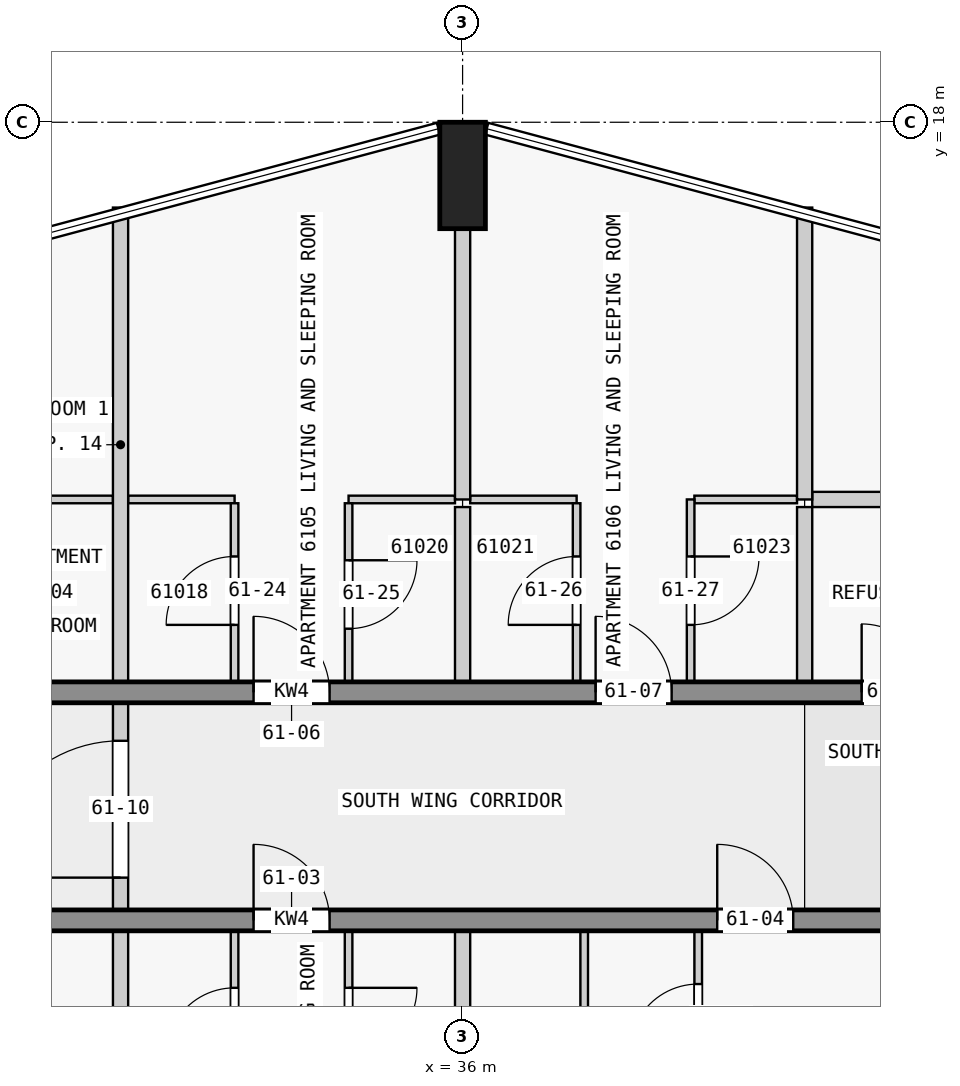
"""IFC4 building model, lengths in metres.
Left out: names, types, materials, properties, quantities, classifications, styles, units other than length and angle.
Written with IfcOpenShell. Run it as: python <this file> out.ifc"""

import sys

from ifc_helpers import new_model, si_unit, direction, frame, frame_2d, origin, origin_2d, place, context, subcontext, project, spatial, rectangle, extrude, element, fill, save


model = new_model("IFC4")
c1 = context("Model", 3, precision=1e-05, world=origin(), true_north=direction((0.0, 1.0)))
c2 = subcontext(c1, "Body", "Model", "MODEL_VIEW")
j1 = project(units=[si_unit("LENGTHUNIT", "METRE"), si_unit("PLANEANGLEUNIT", "RADIAN")], contexts=[c1])
p1 = place(None, origin())
s1 = spatial("IfcSite", under=j1, at=p1, CompositionType="ELEMENT")
p2 = place(p1, origin())
s2 = spatial("IfcBuilding", under=s1, at=p2, CompositionType="ELEMENT")
p3 = place(p2, frame((0.0, 0.0, 232.9)))
s3 = spatial("IfcBuildingStorey", under=s2, at=p3, CompositionType="ELEMENT", Elevation=232.9)
p4 = place(p3, frame((36.0, 17.3, 0.0), z_axis=(0.0, 0.0, 1.0), x_axis=(1.0, 0.0, 0.0)))
e1 = element("IfcColumn", 1, at=p4, inside=s3, PredefinedType="COLUMN", context=c2, shape_type="SweptSolid", body=[
    extrude(rectangle(XDim=0.6, YDim=1.4, at=origin_2d()), origin(), (0.0, 0.0, 1.0), 3.5),
])
p5 = place(p3, frame((22.5, 7.5, 0.0), z_axis=(0.0, 0.0, 1.0), x_axis=(1.0, 0.0, 0.0)))
e2 = element("IfcWall", 2, at=p5, inside=s3, PredefinedType="SHEAR", context=c2, shape_type="SweptSolid", body=[
    extrude(rectangle(XDim=22.5, YDim=0.275, at=frame_2d((11.25, 0.0))), origin(), (0.0, 0.0, 1.0), 3.2),
])
p6 = place(p5, frame((1.75, 0.0, 0.0)))
e3 = element("IfcOpeningElement", 3, at=p6, cuts=e2, PredefinedType="OPENING", context=c2, shape_type="SweptSolid", body=[
    extrude(rectangle(XDim=1.0, YDim=2.1, at=frame_2d((0.5, 1.05))), frame((0.0, 0.147, 0.0), z_axis=(0.0, -1.0, 0.0), x_axis=(1.0, 0.0, 0.0)), (0.0, 0.0, 1.0), 0.295),
])
p7 = place(p5, frame((5.85, 0.0, 0.0)))
e4 = element("IfcOpeningElement", 4, at=p7, cuts=e2, PredefinedType="OPENING", context=c2, shape_type="SweptSolid", body=[
    extrude(rectangle(XDim=1.8, YDim=2.1, at=frame_2d((0.9, 1.05))), frame((0.0, 0.147, 0.0), z_axis=(0.0, -1.0, 0.0), x_axis=(1.0, 0.0, 0.0)), (0.0, 0.0, 1.0), 0.295),
])
p8 = place(p5, frame((10.75, 0.0, 0.0)))
e5 = element("IfcOpeningElement", 5, at=p8, cuts=e2, PredefinedType="OPENING", context=c2, shape_type="SweptSolid", body=[
    extrude(rectangle(XDim=1.0, YDim=2.1, at=frame_2d((0.5, 1.05))), frame((0.0, 0.147, 0.0), z_axis=(0.0, -1.0, 0.0), x_axis=(1.0, 0.0, 0.0)), (0.0, 0.0, 1.0), 0.295),
])
p9 = place(p5, frame((16.85, 0.0, 0.0)))
e6 = element("IfcOpeningElement", 6, at=p9, cuts=e2, PredefinedType="OPENING", context=c2, shape_type="SweptSolid", body=[
    extrude(rectangle(XDim=1.0, YDim=2.1, at=frame_2d((0.5, 1.05))), frame((0.0, 0.147, 0.0), z_axis=(0.0, -1.0, 0.0), x_axis=(1.0, 0.0, 0.0)), (0.0, 0.0, 1.0), 0.295),
])
p10 = place(p3, frame((22.5, 10.5, 0.0), z_axis=(0.0, 0.0, 1.0), x_axis=(1.0, 0.0, 0.0)))
e7 = element("IfcWall", 7, at=p10, inside=s3, PredefinedType="SHEAR", context=c2, shape_type="SweptSolid", body=[
    extrude(rectangle(XDim=22.5, YDim=0.275, at=frame_2d((11.25, 0.0))), origin(), (0.0, 0.0, 1.0), 3.2),
])
p11 = place(p10, frame((4.05, 0.0, 0.0)))
e8 = element("IfcOpeningElement", 8, at=p11, cuts=e7, PredefinedType="OPENING", context=c2, shape_type="SweptSolid", body=[
    extrude(rectangle(XDim=1.0, YDim=2.1, at=frame_2d((0.5, 1.05))), frame((0.0, 0.147, 0.0), z_axis=(0.0, -1.0, 0.0), x_axis=(1.0, 0.0, 0.0)), (0.0, 0.0, 1.0), 0.295),
])
p12 = place(p10, frame((10.75, 0.0, 0.0)))
e9 = element("IfcOpeningElement", 9, at=p12, cuts=e7, PredefinedType="OPENING", context=c2, shape_type="SweptSolid", body=[
    extrude(rectangle(XDim=1.0, YDim=2.1, at=frame_2d((0.5, 1.05))), frame((0.0, 0.147, 0.0), z_axis=(0.0, -1.0, 0.0), x_axis=(1.0, 0.0, 0.0)), (0.0, 0.0, 1.0), 0.295),
])
p13 = place(p10, frame((15.25, 0.0, 0.0)))
e10 = element("IfcOpeningElement", 10, at=p13, cuts=e7, PredefinedType="OPENING", context=c2, shape_type="SweptSolid", body=[
    extrude(rectangle(XDim=1.0, YDim=2.1, at=frame_2d((0.5, 1.05))), frame((0.0, 0.147, 0.0), z_axis=(0.0, -1.0, 0.0), x_axis=(1.0, 0.0, 0.0)), (0.0, 0.0, 1.0), 0.295),
])
p14 = place(p10, frame((18.75, 0.0, 0.0)))
e11 = element("IfcOpeningElement", 11, at=p14, cuts=e7, PredefinedType="OPENING", context=c2, shape_type="SweptSolid", body=[
    extrude(rectangle(XDim=0.9, YDim=2.1, at=frame_2d((0.45, 1.05))), frame((0.0, 0.147, 0.0), z_axis=(0.0, -1.0, 0.0), x_axis=(1.0, 0.0, 0.0)), (0.0, 0.0, 1.0), 0.295),
])
p15 = place(p10, frame((20.95, 0.0, 0.0)))
e12 = element("IfcOpeningElement", 12, at=p15, cuts=e7, PredefinedType="OPENING", context=c2, shape_type="SweptSolid", body=[
    extrude(rectangle(XDim=1.0, YDim=2.1, at=frame_2d((0.5, 1.05))), frame((0.0, 0.147, 0.0), z_axis=(0.0, -1.0, 0.0), x_axis=(1.0, 0.0, 0.0)), (0.0, 0.0, 1.0), 0.295),
])
p16 = place(p3, frame((31.4, 13.038, 0.0), z_axis=(0.0, 0.0, 1.0), x_axis=(-1.0, 0.0, 0.0)))
e13 = element("IfcWall", 13, at=p16, inside=s3, PredefinedType="PARTITIONING", context=c2, shape_type="SweptSolid", body=[
    extrude(rectangle(XDim=1.7, YDim=0.1, at=frame_2d((0.85, 0.0))), origin(), (0.0, 0.0, 1.0), 3.2),
])
for number, where, z_axis, x_axis in (
    (14, (33.0, 13.038, 0.0), (0.0, 0.0, 1.0), (-1.0, 0.0, 0.0)),
    (15, (35.9, 13.038, 0.0), (0.0, 0.0, 1.0), (-1.0, 0.0, 0.0)),
    (16, (37.5, 13.038, 0.0), (0.0, 0.0, 1.0), (-1.0, 0.0, 0.0)),
):
    element("IfcWall", number, at=place(p3, frame(where, z_axis=z_axis, x_axis=x_axis)), inside=s3, PredefinedType="PARTITIONING", context=c2, shape_type="SweptSolid", body=[
        extrude(rectangle(XDim=1.4, YDim=0.1, at=frame_2d((0.7, 0.0))), origin(), (0.0, 0.0, 1.0), 3.2),
    ])
p17 = place(p3, frame((40.4, 13.038, 0.0), z_axis=(0.0, 0.0, 1.0), x_axis=(-1.0, 0.0, 0.0)))
e17 = element("IfcWall", 17, at=p17, inside=s3, PredefinedType="PARTITIONING", context=c2, shape_type="SweptSolid", body=[
    extrude(rectangle(XDim=1.35, YDim=0.1, at=frame_2d((0.675, 0.0))), origin(), (0.0, 0.0, 1.0), 3.2),
])
p18 = place(p3, frame((42.9, 13.038, 0.0), z_axis=(0.0, 0.0, 1.0), x_axis=(-1.0, 0.0, 0.0)))
e18 = element("IfcWall", 18, at=p18, inside=s3, PredefinedType="PARTITIONING", context=c2, shape_type="SweptSolid", body=[
    extrude(rectangle(XDim=2.3, YDim=0.2, at=frame_2d((1.15, 0.0))), origin(), (0.0, 0.0, 1.0), 3.2),
])
for number, where, z_axis, x_axis in (
    (19, (31.5, 1.122, 0.0), (0.0, 0.0, 1.0), (0.0, 1.0, 0.0)),
    (20, (31.5, 10.637, 0.0), (0.0, 0.0, 1.0), (0.0, 1.0, 0.0)),
):
    element("IfcWall", number, at=place(p3, frame(where, z_axis=z_axis, x_axis=x_axis)), inside=s3, PredefinedType="PARTITIONING", context=c2, shape_type="SweptSolid", body=[
        extrude(rectangle(XDim=6.24, YDim=0.2, at=frame_2d((3.12, 0.0))), origin(), (0.0, 0.0, 1.0), 3.2),
    ])
p19 = place(p3, frame((33.0, 4.962, 0.0), z_axis=(0.0, 0.0, 1.0), x_axis=(0.0, 1.0, 0.0)))
e21 = element("IfcWall", 21, at=p19, inside=s3, PredefinedType="PARTITIONING", context=c2, shape_type="SweptSolid", body=[
    extrude(rectangle(XDim=2.4, YDim=0.1, at=frame_2d((1.2, 0.0))), origin(), (0.0, 0.0, 1.0), 3.2),
])
p20 = place(p19, frame((0.75, 0.0, 0.0)))
e22 = element("IfcOpeningElement", 22, at=p20, cuts=e21, PredefinedType="OPENING", context=c2, shape_type="SweptSolid", body=[
    extrude(rectangle(XDim=0.9, YDim=2.1, at=frame_2d((0.45, 1.05))), frame((0.0, 0.06, 0.0), z_axis=(0.0, -1.0, 0.0), x_axis=(1.0, 0.0, 0.0)), (0.0, 0.0, 1.0), 0.12),
])
p21 = place(p3, frame((33.0, 10.637, 0.0), z_axis=(0.0, 0.0, 1.0), x_axis=(0.0, 1.0, 0.0)))
e23 = element("IfcWall", 23, at=p21, inside=s3, PredefinedType="PARTITIONING", context=c2, shape_type="SweptSolid", body=[
    extrude(rectangle(XDim=2.35, YDim=0.1, at=frame_2d((1.175, 0.0))), origin(), (0.0, 0.0, 1.0), 3.2),
])
p22 = place(p21, frame((0.75, 0.0, 0.0)))
e24 = element("IfcOpeningElement", 24, at=p22, cuts=e23, PredefinedType="OPENING", context=c2, shape_type="SweptSolid", body=[
    extrude(rectangle(XDim=0.9, YDim=2.1, at=frame_2d((0.45, 1.05))), frame((0.0, 0.06, 0.0), z_axis=(0.0, -1.0, 0.0), x_axis=(1.0, 0.0, 0.0)), (0.0, 0.0, 1.0), 0.12),
])
p23 = place(p3, frame((34.5, 7.363, 0.0), z_axis=(0.0, 0.0, 1.0), x_axis=(0.0, -1.0, 0.0)))
e25 = element("IfcWall", 25, at=p23, inside=s3, PredefinedType="PARTITIONING", context=c2, shape_type="SweptSolid", body=[
    extrude(rectangle(XDim=2.35, YDim=0.1, at=frame_2d((1.175, 0.0))), origin(), (0.0, 0.0, 1.0), 3.2),
])
p24 = place(p23, frame((0.75, 0.0, 0.0)))
e26 = element("IfcOpeningElement", 26, at=p24, cuts=e25, PredefinedType="OPENING", context=c2, shape_type="SweptSolid", body=[
    extrude(rectangle(XDim=0.9, YDim=2.1, at=frame_2d((0.45, 1.05))), frame((0.0, 0.06, 0.0), z_axis=(0.0, -1.0, 0.0), x_axis=(1.0, 0.0, 0.0)), (0.0, 0.0, 1.0), 0.12),
])
p25 = place(p3, frame((34.5, 12.988, 0.0), z_axis=(0.0, 0.0, 1.0), x_axis=(0.0, -1.0, 0.0)))
e27 = element("IfcWall", 27, at=p25, inside=s3, PredefinedType="PARTITIONING", context=c2, shape_type="SweptSolid", body=[
    extrude(rectangle(XDim=2.35, YDim=0.1, at=frame_2d((1.175, 0.0))), origin(), (0.0, 0.0, 1.0), 3.2),
])
p26 = place(p25, frame((0.75, 0.0, 0.0)))
e28 = element("IfcOpeningElement", 28, at=p26, cuts=e27, PredefinedType="OPENING", context=c2, shape_type="SweptSolid", body=[
    extrude(rectangle(XDim=0.9, YDim=2.1, at=frame_2d((0.45, 1.05))), frame((0.0, 0.06, 0.0), z_axis=(0.0, -1.0, 0.0), x_axis=(1.0, 0.0, 0.0)), (0.0, 0.0, 1.0), 0.12),
])
p27 = place(p3, frame((36.0, 16.6, 0.0), z_axis=(0.0, 0.0, 1.0), x_axis=(0.0, -1.0, 0.0)))
e29 = element("IfcWall", 29, at=p27, inside=s3, PredefinedType="PARTITIONING", context=c2, shape_type="SweptSolid", body=[
    extrude(rectangle(XDim=3.562, YDim=0.2, at=frame_2d((1.781, 0.0))), origin(), (0.0, 0.0, 1.0), 3.2),
])
for number, where, z_axis, x_axis in (
    (30, (36.0, 5.062, 0.0), (0.0, 0.0, 1.0), (0.0, 1.0, 0.0)),
    (31, (36.0, 10.637, 0.0), (0.0, 0.0, 1.0), (0.0, 1.0, 0.0)),
):
    element("IfcWall", number, at=place(p3, frame(where, z_axis=z_axis, x_axis=x_axis)), inside=s3, PredefinedType="PARTITIONING", context=c2, shape_type="SweptSolid", body=[
        extrude(rectangle(XDim=2.3, YDim=0.2, at=frame_2d((1.15, 0.0))), origin(), (0.0, 0.0, 1.0), 3.2),
    ])
p28 = place(p3, frame((37.5, 10.637, 0.0), z_axis=(0.0, 0.0, 1.0), x_axis=(0.0, 1.0, 0.0)))
e32 = element("IfcWall", 32, at=p28, inside=s3, PredefinedType="PARTITIONING", context=c2, shape_type="SweptSolid", body=[
    extrude(rectangle(XDim=2.35, YDim=0.1, at=frame_2d((1.175, 0.0))), origin(), (0.0, 0.0, 1.0), 3.2),
])
p29 = place(p28, frame((0.75, 0.0, 0.0)))
e33 = element("IfcOpeningElement", 33, at=p29, cuts=e32, PredefinedType="OPENING", context=c2, shape_type="SweptSolid", body=[
    extrude(rectangle(XDim=0.9, YDim=2.1, at=frame_2d((0.45, 1.05))), frame((0.0, 0.06, 0.0), z_axis=(0.0, -1.0, 0.0), x_axis=(1.0, 0.0, 0.0)), (0.0, 0.0, 1.0), 0.12),
])
p30 = place(p3, frame((37.6, 5.012, 0.0), z_axis=(0.0, 0.0, 1.0), x_axis=(0.0, 1.0, 0.0)))
e34 = element("IfcWall", 34, at=p30, inside=s3, PredefinedType="PARTITIONING", context=c2, shape_type="SweptSolid", body=[
    extrude(rectangle(XDim=2.35, YDim=0.1, at=frame_2d((1.175, 0.0))), origin(), (0.0, 0.0, 1.0), 3.2),
])
p31 = place(p3, frame((39.0, 13.038, 0.0), z_axis=(0.0, 0.0, 1.0), x_axis=(0.0, -1.0, 0.0)))
e35 = element("IfcWall", 35, at=p31, inside=s3, PredefinedType="PARTITIONING", context=c2, shape_type="SweptSolid", body=[
    extrude(rectangle(XDim=2.4, YDim=0.1, at=frame_2d((1.2, 0.0))), origin(), (0.0, 0.0, 1.0), 3.2),
])
p32 = place(p31, frame((0.75, 0.0, 0.0)))
e36 = element("IfcOpeningElement", 36, at=p32, cuts=e35, PredefinedType="OPENING", context=c2, shape_type="SweptSolid", body=[
    extrude(rectangle(XDim=0.9, YDim=2.1, at=frame_2d((0.45, 1.05))), frame((0.0, 0.06, 0.0), z_axis=(0.0, -1.0, 0.0), x_axis=(1.0, 0.0, 0.0)), (0.0, 0.0, 1.0), 0.12),
])
p33 = place(p3, frame((39.1, 5.012, 0.0), z_axis=(0.0, 0.0, 1.0), x_axis=(0.0, 1.0, 0.0)))
e37 = element("IfcWall", 37, at=p33, inside=s3, PredefinedType="PARTITIONING", context=c2, shape_type="SweptSolid", body=[
    extrude(rectangle(XDim=2.35, YDim=0.1, at=frame_2d((1.175, 0.0))), origin(), (0.0, 0.0, 1.0), 3.2),
])
p34 = place(p33, frame((0.75, 0.0, 0.0)))
e38 = element("IfcOpeningElement", 38, at=p34, cuts=e37, PredefinedType="OPENING", context=c2, shape_type="SweptSolid", body=[
    extrude(rectangle(XDim=0.9, YDim=2.1, at=frame_2d((0.45, 1.05))), frame((0.0, 0.06, 0.0), z_axis=(0.0, -1.0, 0.0), x_axis=(1.0, 0.0, 0.0)), (0.0, 0.0, 1.0), 0.12),
])
p35 = place(p3, frame((40.5, 16.878, 0.0), z_axis=(0.0, 0.0, 1.0), x_axis=(0.0, -1.0, 0.0)))
e39 = element("IfcWall", 39, at=p35, inside=s3, PredefinedType="PARTITIONING", context=c2, shape_type="SweptSolid", body=[
    extrude(rectangle(XDim=3.84, YDim=0.2, at=frame_2d((1.92, 0.0))), origin(), (0.0, 0.0, 1.0), 3.2),
])
p36 = place(p3, frame((40.5, 10.637, 0.0), z_axis=(0.0, 0.0, 1.0), x_axis=(0.0, 1.0, 0.0)))
e40 = element("IfcWall", 40, at=p36, inside=s3, PredefinedType="PARTITIONING", context=c2, shape_type="SweptSolid", body=[
    extrude(rectangle(XDim=2.3, YDim=0.2, at=frame_2d((1.15, 0.0))), origin(), (0.0, 0.0, 1.0), 3.2),
])
p37 = place(p3, frame((31.5, 7.462, 0.0), z_axis=(0.0, 0.0, 1.0), x_axis=(0.0, 1.0, 0.0)))
e41 = element("IfcWall", 41, at=p37, inside=s3, PredefinedType="PARTITIONING", context=c2, shape_type="SweptSolid", body=[
    extrude(rectangle(XDim=3.075, YDim=0.2, at=frame_2d((1.538, 0.0))), origin(), (0.0, 0.0, 1.0), 3.2),
])
p38 = place(p37, frame((0.6, 0.0, 0.0)))
e42 = element("IfcOpeningElement", 42, at=p38, cuts=e41, PredefinedType="OPENING", context=c2, shape_type="SweptSolid", body=[
    extrude(rectangle(XDim=1.8, YDim=2.1, at=frame_2d((0.9, 1.05))), frame((0.0, 0.11, 0.0), z_axis=(0.0, -1.0, 0.0), x_axis=(1.0, 0.0, 0.0)), (0.0, 0.0, 1.0), 0.22),
])
p39 = place(p8, origin())
e43 = element("IfcDoor", 43, at=p39, inside=s3, OperationType="SINGLE_SWING_LEFT", PredefinedType="DOOR", context=c2, shape_type="SweptSolid", body=[
    extrude(rectangle(XDim=1.0, YDim=2.1, at=frame_2d((0.5, 1.05))), frame((0.0, 0.025, 0.0), z_axis=(0.0, -1.0, 0.0), x_axis=(1.0, 0.0, 0.0)), (0.0, 0.0, 1.0), 0.05),
])
fill(e5, e43)
p40 = place(p9, origin())
e44 = element("IfcDoor", 44, at=p40, inside=s3, OperationType="SINGLE_SWING_RIGHT", PredefinedType="DOOR", context=c2, shape_type="SweptSolid", body=[
    extrude(rectangle(XDim=1.0, YDim=2.1, at=frame_2d((0.5, 1.05))), frame((0.0, 0.025, 0.0), z_axis=(0.0, -1.0, 0.0), x_axis=(1.0, 0.0, 0.0)), (0.0, 0.0, 1.0), 0.05),
])
fill(e6, e44)
p41 = place(p12, origin())
e45 = element("IfcDoor", 45, at=p41, inside=s3, OperationType="SINGLE_SWING_LEFT", PredefinedType="DOOR", context=c2, shape_type="SweptSolid", body=[
    extrude(rectangle(XDim=1.0, YDim=2.1, at=frame_2d((0.5, 1.05))), frame((0.0, 0.025, 0.0), z_axis=(0.0, -1.0, 0.0), x_axis=(1.0, 0.0, 0.0)), (0.0, 0.0, 1.0), 0.05),
])
fill(e9, e45)
p42 = place(p13, origin())
e46 = element("IfcDoor", 46, at=p42, inside=s3, OperationType="SINGLE_SWING_RIGHT", PredefinedType="DOOR", context=c2, shape_type="SweptSolid", body=[
    extrude(rectangle(XDim=1.0, YDim=2.1, at=frame_2d((0.5, 1.05))), frame((0.0, 0.025, 0.0), z_axis=(0.0, -1.0, 0.0), x_axis=(1.0, 0.0, 0.0)), (0.0, 0.0, 1.0), 0.05),
])
fill(e10, e46)
p43 = place(p14, origin())
e47 = element("IfcDoor", 47, at=p43, inside=s3, OperationType="SINGLE_SWING_RIGHT", PredefinedType="DOOR", context=c2, shape_type="SweptSolid", body=[
    extrude(rectangle(XDim=0.9, YDim=2.1, at=frame_2d((0.45, 1.05))), frame((0.0, 0.025, 0.0), z_axis=(0.0, -1.0, 0.0), x_axis=(1.0, 0.0, 0.0)), (0.0, 0.0, 1.0), 0.05),
])
fill(e11, e47)
p44 = place(p38, origin())
e48 = element("IfcDoor", 48, at=p44, inside=s3, OperationType="SINGLE_SWING_LEFT", PredefinedType="DOOR", context=c2, shape_type="SweptSolid", body=[
    extrude(rectangle(XDim=1.8, YDim=2.1, at=frame_2d((0.9, 1.05))), frame((0.0, 0.025, 0.0), z_axis=(0.0, -1.0, 0.0), x_axis=(1.0, 0.0, 0.0)), (0.0, 0.0, 1.0), 0.05),
])
fill(e42, e48)
p45 = place(p20, origin())
e49 = element("IfcDoor", 49, at=p45, inside=s3, OperationType="SINGLE_SWING_RIGHT", PredefinedType="DOOR", context=c2, shape_type="SweptSolid", body=[
    extrude(rectangle(XDim=0.9, YDim=2.1, at=frame_2d((0.45, 1.05))), frame((0.0, 0.025, 0.0), z_axis=(0.0, -1.0, 0.0), x_axis=(1.0, 0.0, 0.0)), (0.0, 0.0, 1.0), 0.05),
])
fill(e22, e49)
p46 = place(p24, origin())
e50 = element("IfcDoor", 50, at=p46, inside=s3, OperationType="SINGLE_SWING_RIGHT", PredefinedType="DOOR", context=c2, shape_type="SweptSolid", body=[
    extrude(rectangle(XDim=0.9, YDim=2.1, at=frame_2d((0.45, 1.05))), frame((0.0, 0.025, 0.0), z_axis=(0.0, -1.0, 0.0), x_axis=(1.0, 0.0, 0.0)), (0.0, 0.0, 1.0), 0.05),
])
fill(e26, e50)
p47 = place(p34, origin())
e51 = element("IfcDoor", 51, at=p47, inside=s3, OperationType="SINGLE_SWING_RIGHT", PredefinedType="DOOR", context=c2, shape_type="SweptSolid", body=[
    extrude(rectangle(XDim=0.9, YDim=2.1, at=frame_2d((0.45, 1.05))), frame((0.0, 0.025, 0.0), z_axis=(0.0, -1.0, 0.0), x_axis=(1.0, 0.0, 0.0)), (0.0, 0.0, 1.0), 0.05),
])
fill(e38, e51)
p48 = place(p22, origin())
e52 = element("IfcDoor", 52, at=p48, inside=s3, OperationType="SINGLE_SWING_RIGHT", PredefinedType="DOOR", context=c2, shape_type="SweptSolid", body=[
    extrude(rectangle(XDim=0.9, YDim=2.1, at=frame_2d((0.45, 1.05))), frame((0.0, 0.025, 0.0), z_axis=(0.0, -1.0, 0.0), x_axis=(1.0, 0.0, 0.0)), (0.0, 0.0, 1.0), 0.05),
])
fill(e24, e52)
p49 = place(p26, origin())
e53 = element("IfcDoor", 53, at=p49, inside=s3, OperationType="SINGLE_SWING_RIGHT", PredefinedType="DOOR", context=c2, shape_type="SweptSolid", body=[
    extrude(rectangle(XDim=0.9, YDim=2.1, at=frame_2d((0.45, 1.05))), frame((0.0, 0.025, 0.0), z_axis=(0.0, -1.0, 0.0), x_axis=(1.0, 0.0, 0.0)), (0.0, 0.0, 1.0), 0.05),
])
fill(e28, e53)
p50 = place(p29, origin())
e54 = element("IfcDoor", 54, at=p50, inside=s3, OperationType="SINGLE_SWING_RIGHT", PredefinedType="DOOR", context=c2, shape_type="SweptSolid", body=[
    extrude(rectangle(XDim=0.9, YDim=2.1, at=frame_2d((0.45, 1.05))), frame((0.0, 0.025, 0.0), z_axis=(0.0, -1.0, 0.0), x_axis=(1.0, 0.0, 0.0)), (0.0, 0.0, 1.0), 0.05),
])
fill(e33, e54)
p51 = place(p32, origin())
e55 = element("IfcDoor", 55, at=p51, inside=s3, OperationType="SINGLE_SWING_LEFT", PredefinedType="DOOR", context=c2, shape_type="SweptSolid", body=[
    extrude(rectangle(XDim=0.9, YDim=2.1, at=frame_2d((0.45, 1.05))), frame((0.0, 0.025, 0.0), z_axis=(0.0, -1.0, 0.0), x_axis=(1.0, 0.0, 0.0)), (0.0, 0.0, 1.0), 0.05),
])
fill(e36, e55)
save(model, sys.argv[1])
